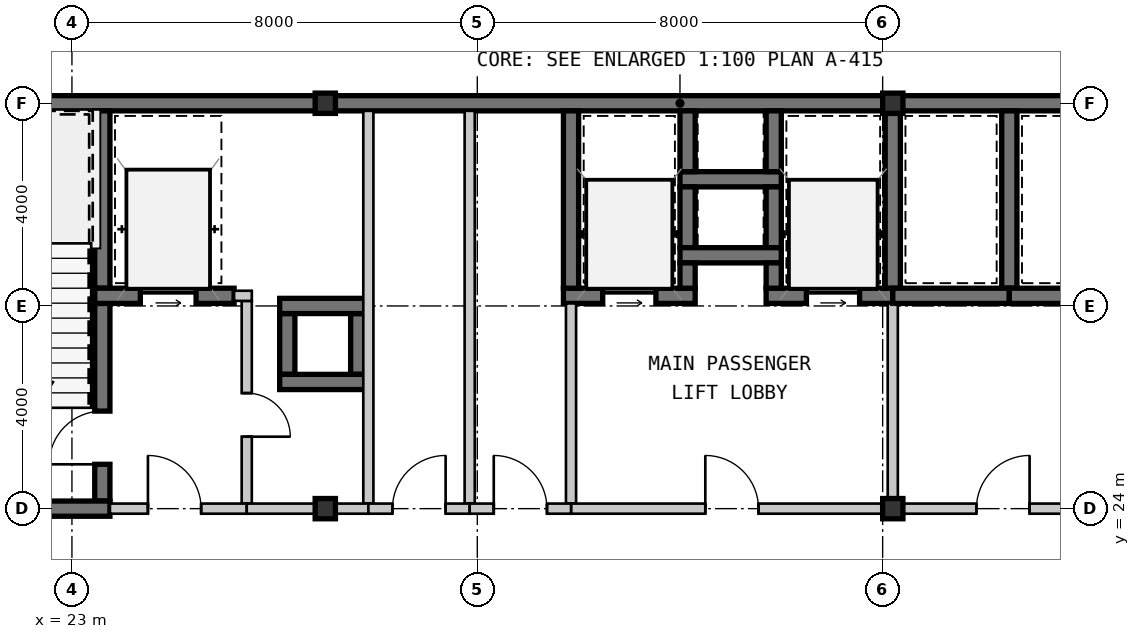
"""IFC4 building model, lengths in metres.
Left out: names, types, materials, properties, quantities, classifications, styles, units other than length and angle.
Written with IfcOpenShell. Run it as: python <this file> out.ifc"""

import sys

from ifc_helpers import new_model, si_unit, direction, frame, frame_2d, origin, origin_2d, place, context, subcontext, project, spatial, rectangle, hollow_rectangle, extrude, source, transform, mapped, element, fill, save


model = new_model("IFC4")
c1 = context("Model", 3, precision=1e-05, world=origin(), true_north=direction((0.0, 1.0)))
c2 = subcontext(c1, "Body", "Model", "MODEL_VIEW")
j1 = project(units=[si_unit("LENGTHUNIT", "METRE"), si_unit("PLANEANGLEUNIT", "RADIAN")], contexts=[c1])
p1 = place(None, origin())
s1 = spatial("IfcSite", under=j1, at=p1, CompositionType="ELEMENT")
p2 = place(p1, origin())
s2 = spatial("IfcBuilding", under=s1, at=p2, CompositionType="ELEMENT")
p3 = place(p2, frame((0.0, 0.0, 133.0)))
s3 = spatial("IfcBuildingStorey", under=s2, at=p3, CompositionType="ELEMENT", Elevation=133.0)
m1 = source(origin(), c2, "Body", "SweptSolid", [
    extrude(hollow_rectangle(XDim=0.4, YDim=0.4, WallThickness=0.016, at=origin_2d()), origin(), (0.0, 0.0, 1.0), 3.15),
])
for number, where, z_axis, x_axis in (
    (1, (28.0, 24.0, 0.0), (0.0, 0.0, 1.0), (1.0, 0.0, 0.0)),
    (2, (39.2, 24.0, 0.0), (0.0, 0.0, 1.0), (1.0, 0.0, 0.0)),
    (3, (28.0, 32.0, 0.0), (0.0, 0.0, 1.0), (1.0, 0.0, 0.0)),
    (4, (39.2, 32.0, 0.0), (0.0, 0.0, 1.0), (1.0, 0.0, 0.0)),
):
    element("IfcColumn", number, at=place(p3, frame(where, z_axis=z_axis, x_axis=x_axis)), inside=s3, PredefinedType="COLUMN", context=c2, shape_type="MappedRepresentation", body=[
        mapped(m1, transform((0.0, 0.0, 0.0), scale=1.0)),
    ])
m2 = source(origin(), c2, "Body", "SweptSolid", [
    extrude(rectangle(XDim=9.15, YDim=0.3, at=frame_2d((4.575, 0.0))), origin(), (0.0, 0.0, 1.0), 2.93),
])
p4 = place(p3, frame((18.85, 32.0, 0.0), z_axis=(0.0, 0.0, 1.0), x_axis=(1.0, 0.0, 0.0)))
e5 = element("IfcWall", 5, at=p4, inside=s3, PredefinedType="SHEAR", context=c2, shape_type="MappedRepresentation", body=[
    mapped(m2, transform((0.0, 0.0, 0.0), scale=1.0)),
])
m3 = source(origin(), c2, "Body", "SweptSolid", [
    extrude(rectangle(XDim=11.2, YDim=0.3, at=frame_2d((5.6, 0.0))), origin(), (0.0, 0.0, 1.0), 2.93),
])
p5 = place(p3, frame((28.0, 32.0, 0.0), z_axis=(0.0, 0.0, 1.0), x_axis=(1.0, 0.0, 0.0)))
e6 = element("IfcWall", 6, at=p5, inside=s3, PredefinedType="SHEAR", context=c2, shape_type="MappedRepresentation", body=[
    mapped(m3, transform((0.0, 0.0, 0.0), scale=1.0)),
])
m4 = source(origin(), c2, "Body", "SweptSolid", [
    extrude(rectangle(XDim=11.95, YDim=0.3, at=frame_2d((5.975, 0.0))), origin(), (0.0, 0.0, 1.0), 2.93),
])
p6 = place(p3, frame((39.2, 32.0, 0.0), z_axis=(0.0, 0.0, 1.0), x_axis=(1.0, 0.0, 0.0)))
e7 = element("IfcWall", 7, at=p6, inside=s3, PredefinedType="SHEAR", context=c2, shape_type="MappedRepresentation", body=[
    mapped(m4, transform((0.0, 0.0, 0.0), scale=1.0)),
])
m5 = source(origin(), c2, "Body", "SweptSolid", [
    extrude(rectangle(XDim=3.5, YDim=0.3, at=frame_2d((1.75, 0.0))), origin(), (0.0, 0.0, 1.0), 2.93),
])
p7 = place(p3, frame((23.6, 28.35, 0.0), z_axis=(0.0, 0.0, 1.0), x_axis=(0.0, 1.0, 0.0)))
e8 = element("IfcWall", 8, at=p7, inside=s3, PredefinedType="SHEAR", context=c2, shape_type="MappedRepresentation", body=[
    mapped(m5, transform((0.0, 0.0, 0.0), scale=1.0)),
])
m6 = source(origin(), c2, "Body", "SweptSolid", [
    extrude(rectangle(XDim=3.9, YDim=0.3, at=frame_2d((1.95, 0.0))), origin(), (0.0, 0.0, 1.0), 2.93),
])
p8 = place(p3, frame((23.6, 24.15, 0.0), z_axis=(0.0, 0.0, 1.0), x_axis=(0.0, 1.0, 0.0)))
e9 = element("IfcWall", 9, at=p8, inside=s3, PredefinedType="SHEAR", context=c2, shape_type="MappedRepresentation", body=[
    mapped(m6, transform((0.0, 0.0, 0.0), scale=1.0)),
])
m7 = source(origin(), c2, "Body", "SweptSolid", [
    extrude(rectangle(XDim=1.05, YDim=2.1, at=frame_2d((0.525, 1.05))), frame((0.0, 0.16, 0.0), z_axis=(0.0, -1.0, 0.0), x_axis=(1.0, 0.0, 0.0)), (0.0, 0.0, 1.0), 0.32),
])
p9 = place(p8, frame((0.725, 0.0, 0.0)))
e10 = element("IfcOpeningElement", 10, at=p9, cuts=e9, PredefinedType="OPENING", context=c2, shape_type="MappedRepresentation", body=[
    mapped(m7, transform((0.0, 0.0, 0.0), scale=1.0)),
])
m8 = source(origin(), c2, "Body", "SweptSolid", [
    extrude(rectangle(XDim=4.9, YDim=0.3, at=frame_2d((2.45, 0.0))), origin(), (0.0, 0.0, 1.0), 2.93),
])
p10 = place(p3, frame((18.85, 24.0, 0.0), z_axis=(0.0, 0.0, 1.0), x_axis=(1.0, 0.0, 0.0)))
e11 = element("IfcWall", 11, at=p10, inside=s3, PredefinedType="SHEAR", context=c2, shape_type="MappedRepresentation", body=[
    mapped(m8, transform((0.0, 0.0, 0.0), scale=1.0)),
])
m9 = source(origin(), c2, "Body", "SweptSolid", [
    extrude(rectangle(XDim=2.75, YDim=0.3, at=frame_2d((1.375, 0.0))), origin(), (0.0, 0.0, 1.0), 2.93),
])
p11 = place(p3, frame((23.45, 28.2, 0.0), z_axis=(0.0, 0.0, 1.0), x_axis=(1.0, 0.0, 0.0)))
e12 = element("IfcWall", 12, at=p11, inside=s3, PredefinedType="SHEAR", context=c2, shape_type="MappedRepresentation", body=[
    mapped(m9, transform((0.0, 0.0, 0.0), scale=1.0)),
])
m10 = source(origin(), c2, "Body", "SweptSolid", [
    extrude(rectangle(XDim=1.1, YDim=2.15, at=frame_2d((0.55, 1.075))), frame((0.0, 0.16, 0.0), z_axis=(0.0, -1.0, 0.0), x_axis=(1.0, 0.0, 0.0)), (0.0, 0.0, 1.0), 0.32),
])
p12 = place(p11, frame((0.9, 0.0, 0.0)))
e13 = element("IfcOpeningElement", 13, at=p12, cuts=e12, PredefinedType="OPENING", context=c2, shape_type="MappedRepresentation", body=[
    mapped(m10, transform((0.0, 0.0, 0.0), scale=1.0)),
])
m11 = source(origin(), c2, "Body", "SweptSolid", [
    extrude(rectangle(XDim=4.0, YDim=0.2, at=frame_2d((2.0, 0.0))), origin(), (0.0, 0.0, 1.0), 2.93),
])
p13 = place(p3, frame((26.45, 24.1, 0.0), z_axis=(0.0, 0.0, 1.0), x_axis=(0.0, 1.0, 0.0)))
e14 = element("IfcWall", 14, at=p13, inside=s3, PredefinedType="SOLIDWALL", context=c2, shape_type="MappedRepresentation", body=[
    mapped(m11, transform((0.0, 0.0, 0.0), scale=1.0)),
])
m12 = source(origin(), c2, "Body", "SweptSolid", [
    extrude(rectangle(XDim=0.86, YDim=2.1, at=frame_2d((0.43, 1.05))), frame((0.0, 0.11, 0.0), z_axis=(0.0, -1.0, 0.0), x_axis=(1.0, 0.0, 0.0)), (0.0, 0.0, 1.0), 0.22),
])
p14 = place(p13, frame((1.32, 0.0, 0.0)))
e15 = element("IfcOpeningElement", 15, at=p14, cuts=e14, PredefinedType="OPENING", context=c2, shape_type="MappedRepresentation", body=[
    mapped(m12, transform((0.0, 0.0, 0.0), scale=1.0)),
])
m13 = source(origin(), c2, "Body", "SweptSolid", [
    extrude(rectangle(XDim=2.7, YDim=0.2, at=frame_2d((1.35, 0.0))), origin(), (0.0, 0.0, 1.0), 2.47),
])
p15 = place(p3, frame((23.75, 24.0, 0.0), z_axis=(0.0, 0.0, 1.0), x_axis=(1.0, 0.0, 0.0)))
e16 = element("IfcWall", 16, at=p15, inside=s3, PredefinedType="SOLIDWALL", context=c2, shape_type="MappedRepresentation", body=[
    mapped(m13, transform((0.0, 0.0, 0.0), scale=1.0)),
])
m14 = source(origin(), c2, "Body", "SweptSolid", [
    extrude(rectangle(XDim=1.05, YDim=2.1, at=frame_2d((0.525, 1.05))), frame((0.0, 0.11, 0.0), z_axis=(0.0, -1.0, 0.0), x_axis=(1.0, 0.0, 0.0)), (0.0, 0.0, 1.0), 0.22),
])
p16 = place(p15, frame((0.75, 0.0, 0.0)))
e17 = element("IfcOpeningElement", 17, at=p16, cuts=e16, PredefinedType="OPENING", context=c2, shape_type="MappedRepresentation", body=[
    mapped(m14, transform((0.0, 0.0, 0.0), scale=1.0)),
])
m15 = source(origin(), c2, "Body", "SweptSolid", [
    extrude(rectangle(XDim=2.0, YDim=0.3, at=frame_2d((1.0, 0.0))), origin(), (0.0, 0.0, 1.0), 2.93),
])
p17 = place(p3, frame((35.0, 30.5, 0.0), z_axis=(0.0, 0.0, 1.0), x_axis=(1.0, 0.0, 0.0)))
e18 = element("IfcWall", 18, at=p17, inside=s3, PredefinedType="SHEAR", context=c2, shape_type="MappedRepresentation", body=[
    mapped(m15, transform((0.0, 0.0, 0.0), scale=1.0)),
])
m16 = source(origin(), c2, "Body", "SweptSolid", [
    extrude(rectangle(XDim=1.2, YDim=0.3, at=frame_2d((0.6, 0.0))), origin(), (0.0, 0.0, 1.0), 2.93),
])
for number, where, z_axis, x_axis in (
    (19, (35.15, 31.85, 0.0), (0.0, 0.0, 1.0), (0.0, -1.0, 0.0)),
    (20, (36.85, 30.65, 0.0), (0.0, 0.0, 1.0), (0.0, 1.0, 0.0)),
    (21, (35.15, 30.35, 0.0), (0.0, 0.0, 1.0), (0.0, -1.0, 0.0)),
    (22, (36.85, 29.15, 0.0), (0.0, 0.0, 1.0), (0.0, 1.0, 0.0)),
):
    element("IfcWall", number, at=place(p3, frame(where, z_axis=z_axis, x_axis=x_axis)), inside=s3, PredefinedType="SHEAR", context=c2, shape_type="MappedRepresentation", body=[
        mapped(m16, transform((0.0, 0.0, 0.0), scale=1.0)),
    ])
p18 = place(p3, frame((35.0, 29.0, 0.0), z_axis=(0.0, 0.0, 1.0), x_axis=(1.0, 0.0, 0.0)))
e23 = element("IfcWall", 23, at=p18, inside=s3, PredefinedType="SHEAR", context=c2, shape_type="MappedRepresentation", body=[
    mapped(m15, transform((0.0, 0.0, 0.0), scale=1.0)),
])
for number, where, z_axis, x_axis in (
    (24, (28.65, 26.65, 0.0), (0.0, 0.0, 1.0), (0.0, 1.0, 0.0)),
    (25, (27.25, 27.85, 0.0), (0.0, 0.0, 1.0), (0.0, -1.0, 0.0)),
):
    element("IfcWall", number, at=place(p3, frame(where, z_axis=z_axis, x_axis=x_axis)), inside=s3, PredefinedType="SHEAR", context=c2, shape_type="MappedRepresentation", body=[
        mapped(m16, transform((0.0, 0.0, 0.0), scale=1.0)),
    ])
m17 = source(origin(), c2, "Body", "SweptSolid", [
    extrude(rectangle(XDim=1.7, YDim=0.3, at=frame_2d((0.85, 0.0))), origin(), (0.0, 0.0, 1.0), 2.93),
])
for number, where, z_axis, x_axis in (
    (26, (28.8, 28.0, 0.0), (0.0, 0.0, 1.0), (-1.0, 0.0, 0.0)),
    (27, (27.1, 26.5, 0.0), (0.0, 0.0, 1.0), (1.0, 0.0, 0.0)),
):
    element("IfcWall", number, at=place(p3, frame(where, z_axis=z_axis, x_axis=x_axis)), inside=s3, PredefinedType="SHEAR", context=c2, shape_type="MappedRepresentation", body=[
        mapped(m17, transform((0.0, 0.0, 0.0), scale=1.0)),
    ])
m18 = source(origin(), c2, "Body", "SweptSolid", [
    extrude(rectangle(XDim=2.6, YDim=0.3, at=frame_2d((1.3, 0.0))), origin(), (0.0, 0.0, 1.0), 2.93),
])
p19 = place(p3, frame((32.7, 28.2, 0.0), z_axis=(0.0, 0.0, 1.0), x_axis=(1.0, 0.0, 0.0)))
e28 = element("IfcWall", 28, at=p19, inside=s3, PredefinedType="SHEAR", context=c2, shape_type="MappedRepresentation", body=[
    mapped(m18, transform((0.0, 0.0, 0.0), scale=1.0)),
])
m19 = source(origin(), c2, "Body", "SweptSolid", [
    extrude(rectangle(XDim=1.05, YDim=2.15, at=frame_2d((0.525, 1.075))), frame((0.0, 0.16, 0.0), z_axis=(0.0, -1.0, 0.0), x_axis=(1.0, 0.0, 0.0)), (0.0, 0.0, 1.0), 0.32),
])
p20 = place(p19, frame((0.775, 0.0, 0.0)))
e29 = element("IfcOpeningElement", 29, at=p20, cuts=e28, PredefinedType="OPENING", context=c2, shape_type="MappedRepresentation", body=[
    mapped(m19, transform((0.0, 0.0, 0.0), scale=1.0)),
])
m20 = source(origin(), c2, "Body", "SweptSolid", [
    extrude(rectangle(XDim=0.5, YDim=0.3, at=frame_2d((0.25, 0.0))), origin(), (0.0, 0.0, 1.0), 2.93),
])
p21 = place(p3, frame((35.15, 28.35, 0.0), z_axis=(0.0, 0.0, 1.0), x_axis=(0.0, 1.0, 0.0)))
e30 = element("IfcWall", 30, at=p21, inside=s3, PredefinedType="SHEAR", context=c2, shape_type="MappedRepresentation", body=[
    mapped(m20, transform((0.0, 0.0, 0.0), scale=1.0)),
])
p22 = place(p3, frame((32.85, 31.85, 0.0), z_axis=(0.0, 0.0, 1.0), x_axis=(0.0, -1.0, 0.0)))
e31 = element("IfcWall", 31, at=p22, inside=s3, PredefinedType="SHEAR", context=c2, shape_type="MappedRepresentation", body=[
    mapped(m5, transform((0.0, 0.0, 0.0), scale=1.0)),
])
m21 = source(origin(), c2, "Body", "SweptSolid", [
    extrude(rectangle(XDim=2.5, YDim=0.3, at=frame_2d((1.25, 0.0))), origin(), (0.0, 0.0, 1.0), 2.93),
])
p23 = place(p3, frame((36.7, 28.2, 0.0), z_axis=(0.0, 0.0, 1.0), x_axis=(1.0, 0.0, 0.0)))
e32 = element("IfcWall", 32, at=p23, inside=s3, PredefinedType="SHEAR", context=c2, shape_type="MappedRepresentation", body=[
    mapped(m21, transform((0.0, 0.0, 0.0), scale=1.0)),
])
p24 = place(p23, frame((0.795, 0.0, 0.0)))
e33 = element("IfcOpeningElement", 33, at=p24, cuts=e32, PredefinedType="OPENING", context=c2, shape_type="MappedRepresentation", body=[
    mapped(m19, transform((0.0, 0.0, 0.0), scale=1.0)),
])
p25 = place(p3, frame((36.85, 28.85, 0.0), z_axis=(0.0, 0.0, 1.0), x_axis=(0.0, -1.0, 0.0)))
e34 = element("IfcWall", 34, at=p25, inside=s3, PredefinedType="SHEAR", context=c2, shape_type="MappedRepresentation", body=[
    mapped(m20, transform((0.0, 0.0, 0.0), scale=1.0)),
])
p26 = place(p3, frame((39.2, 28.35, 0.0), z_axis=(0.0, 0.0, 1.0), x_axis=(0.0, 1.0, 0.0)))
e35 = element("IfcWall", 35, at=p26, inside=s3, PredefinedType="SHEAR", context=c2, shape_type="MappedRepresentation", body=[
    mapped(m5, transform((0.0, 0.0, 0.0), scale=1.0)),
])
m22 = source(origin(), c2, "Body", "SweptSolid", [
    extrude(rectangle(XDim=3.95, YDim=0.2, at=frame_2d((1.975, 0.0))), origin(), (0.0, 0.0, 1.0), 2.93),
])
p27 = place(p3, frame((32.85, 24.1, 0.0), z_axis=(0.0, 0.0, 1.0), x_axis=(0.0, 1.0, 0.0)))
e36 = element("IfcWall", 36, at=p27, inside=s3, PredefinedType="SOLIDWALL", context=c2, shape_type="MappedRepresentation", body=[
    mapped(m22, transform((0.0, 0.0, 0.0), scale=1.0)),
])
m23 = source(origin(), c2, "Body", "SweptSolid", [
    extrude(rectangle(XDim=3.95, YDim=0.2, at=frame_2d((1.975, 0.0))), origin(), (0.0, 0.0, 1.0), 2.47),
])
p28 = place(p3, frame((39.2, 28.05, 0.0), z_axis=(0.0, 0.0, 1.0), x_axis=(0.0, -1.0, 0.0)))
e37 = element("IfcWall", 37, at=p28, inside=s3, PredefinedType="SOLIDWALL", context=c2, shape_type="MappedRepresentation", body=[
    mapped(m23, transform((0.0, 0.0, 0.0), scale=1.0)),
])
m24 = source(origin(), c2, "Body", "SweptSolid", [
    extrude(rectangle(XDim=6.35, YDim=0.2, at=frame_2d((3.175, 0.0))), origin(), (0.0, 0.0, 1.0), 2.47),
])
p29 = place(p3, frame((39.2, 24.0, 0.0), z_axis=(0.0, 0.0, 1.0), x_axis=(-1.0, 0.0, 0.0)))
e38 = element("IfcWall", 38, at=p29, inside=s3, PredefinedType="SOLIDWALL", context=c2, shape_type="MappedRepresentation", body=[
    mapped(m24, transform((0.0, 0.0, 0.0), scale=1.0)),
])
p30 = place(p29, frame((2.65, 0.0, 0.0)))
e39 = element("IfcOpeningElement", 39, at=p30, cuts=e38, PredefinedType="OPENING", context=c2, shape_type="MappedRepresentation", body=[
    mapped(m14, transform((0.0, 0.0, 0.0), scale=1.0)),
])
p31 = place(p3, frame((41.5, 28.35, 0.0), z_axis=(0.0, 0.0, 1.0), x_axis=(0.0, 1.0, 0.0)))
e40 = element("IfcWall", 40, at=p31, inside=s3, PredefinedType="SHEAR", context=c2, shape_type="MappedRepresentation", body=[
    mapped(m5, transform((0.0, 0.0, 0.0), scale=1.0)),
])
m25 = source(origin(), c2, "Body", "SweptSolid", [
    extrude(rectangle(XDim=2.3, YDim=0.3, at=frame_2d((1.15, 0.0))), origin(), (0.0, 0.0, 1.0), 2.93),
])
p32 = place(p3, frame((39.2, 28.2, 0.0), z_axis=(0.0, 0.0, 1.0), x_axis=(1.0, 0.0, 0.0)))
e41 = element("IfcWall", 41, at=p32, inside=s3, PredefinedType="SHEAR", context=c2, shape_type="MappedRepresentation", body=[
    mapped(m25, transform((0.0, 0.0, 0.0), scale=1.0)),
])
m26 = source(origin(), c2, "Body", "SweptSolid", [
    extrude(rectangle(XDim=2.07, YDim=0.3, at=frame_2d((1.035, 0.0))), origin(), (0.0, 0.0, 1.0), 2.93),
])
p33 = place(p3, frame((41.5, 28.2, 0.0), z_axis=(0.0, 0.0, 1.0), x_axis=(1.0, 0.0, 0.0)))
e42 = element("IfcWall", 42, at=p33, inside=s3, PredefinedType="SHEAR", context=c2, shape_type="MappedRepresentation", body=[
    mapped(m26, transform((0.0, 0.0, 0.0), scale=1.0)),
])
m27 = source(origin(), c2, "Body", "SweptSolid", [
    extrude(rectangle(XDim=7.75, YDim=0.2, at=frame_2d((3.875, 0.0))), origin(), (0.0, 0.0, 1.0), 2.93),
])
p34 = place(p3, frame((28.85, 31.85, 0.0), z_axis=(0.0, 0.0, 1.0), x_axis=(0.0, -1.0, 0.0)))
e43 = element("IfcWall", 43, at=p34, inside=s3, PredefinedType="SOLIDWALL", context=c2, shape_type="MappedRepresentation", body=[
    mapped(m27, transform((0.0, 0.0, 0.0), scale=1.0)),
])
m28 = source(origin(), c2, "Body", "SweptSolid", [
    extrude(rectangle(XDim=2.4, YDim=0.2, at=frame_2d((1.2, 0.0))), origin(), (0.0, 0.0, 1.0), 2.47),
])
p35 = place(p3, frame((28.85, 24.0, 0.0), z_axis=(0.0, 0.0, 1.0), x_axis=(-1.0, 0.0, 0.0)))
e44 = element("IfcWall", 44, at=p35, inside=s3, PredefinedType="SOLIDWALL", context=c2, shape_type="MappedRepresentation", body=[
    mapped(m28, transform((0.0, 0.0, 0.0), scale=1.0)),
])
p36 = place(p3, frame((30.85, 31.85, 0.0), z_axis=(0.0, 0.0, 1.0), x_axis=(0.0, -1.0, 0.0)))
e45 = element("IfcWall", 45, at=p36, inside=s3, PredefinedType="SOLIDWALL", context=c2, shape_type="MappedRepresentation", body=[
    mapped(m27, transform((0.0, 0.0, 0.0), scale=1.0)),
])
m29 = source(origin(), c2, "Body", "SweptSolid", [
    extrude(rectangle(XDim=2.0, YDim=0.2, at=frame_2d((1.0, 0.0))), origin(), (0.0, 0.0, 1.0), 2.47),
])
p37 = place(p3, frame((30.85, 24.0, 0.0), z_axis=(0.0, 0.0, 1.0), x_axis=(-1.0, 0.0, 0.0)))
e46 = element("IfcWall", 46, at=p37, inside=s3, PredefinedType="SOLIDWALL", context=c2, shape_type="MappedRepresentation", body=[
    mapped(m29, transform((0.0, 0.0, 0.0), scale=1.0)),
])
p38 = place(p37, frame((0.475, 0.0, 0.0)))
e47 = element("IfcOpeningElement", 47, at=p38, cuts=e46, PredefinedType="OPENING", context=c2, shape_type="MappedRepresentation", body=[
    mapped(m14, transform((0.0, 0.0, 0.0), scale=1.0)),
])
p39 = place(p3, frame((32.85, 24.0, 0.0), z_axis=(0.0, 0.0, 1.0), x_axis=(-1.0, 0.0, 0.0)))
e48 = element("IfcWall", 48, at=p39, inside=s3, PredefinedType="SOLIDWALL", context=c2, shape_type="MappedRepresentation", body=[
    mapped(m29, transform((0.0, 0.0, 0.0), scale=1.0)),
])
p40 = place(p39, frame((0.475, 0.0, 0.0)))
e49 = element("IfcOpeningElement", 49, at=p40, cuts=e48, PredefinedType="OPENING", context=c2, shape_type="MappedRepresentation", body=[
    mapped(m14, transform((0.0, 0.0, 0.0), scale=1.0)),
])
m30 = source(origin(), c2, "Body", "SweptSolid", [
    extrude(rectangle(XDim=4.35, YDim=0.2, at=frame_2d((2.175, 0.0))), origin(), (0.0, 0.0, 1.0), 2.397),
])
p41 = place(p3, frame((43.55, 24.0, 0.0), z_axis=(0.0, 0.0, 1.0), x_axis=(-1.0, 0.0, 0.0)))
e50 = element("IfcWall", 50, at=p41, inside=s3, PredefinedType="SOLIDWALL", context=c2, shape_type="MappedRepresentation", body=[
    mapped(m30, transform((0.0, 0.0, 0.0), scale=1.0)),
])
p42 = place(p41, frame((1.65, 0.0, 0.0)))
e51 = element("IfcOpeningElement", 51, at=p42, cuts=e50, PredefinedType="OPENING", context=c2, shape_type="MappedRepresentation", body=[
    mapped(m14, transform((0.0, 0.0, 0.0), scale=1.0)),
])
m31 = source(origin(), c2, "Body", "SweptSolid", [
    extrude(rectangle(XDim=0.35, YDim=0.2, at=frame_2d((0.175, 0.0))), origin(), (0.0, 0.0, 1.0), 2.93),
])
p43 = place(p3, frame((26.2, 28.2, 0.0), z_axis=(0.0, 0.0, 1.0), x_axis=(1.0, 0.0, 0.0)))
e52 = element("IfcWall", 52, at=p43, inside=s3, PredefinedType="SOLIDWALL", context=c2, shape_type="MappedRepresentation", body=[
    mapped(m31, transform((0.0, 0.0, 0.0), scale=1.0)),
])
m32 = source(origin(), c2, "Body", "SweptSolid", [
    extrude(rectangle(XDim=1.05, YDim=2.1, at=frame_2d((0.525, 1.05))), frame((0.0, 0.025, 0.0), z_axis=(0.0, -1.0, 0.0), x_axis=(1.0, 0.0, 0.0)), (0.0, 0.0, 1.0), 0.05),
])
p44 = place(p9, origin())
e53 = element("IfcDoor", 53, at=p44, inside=s3, OperationType="SINGLE_SWING_LEFT", PredefinedType="DOOR", context=c2, shape_type="MappedRepresentation", body=[
    mapped(m32, transform((0.0, 0.0, 0.0), scale=1.0)),
])
fill(e10, e53)
m33 = source(origin(), c2, "Body", "SweptSolid", [
    extrude(rectangle(XDim=1.1, YDim=2.15, at=frame_2d((0.55, 1.075))), frame((0.0, 0.025, 0.0), z_axis=(0.0, -1.0, 0.0), x_axis=(1.0, 0.0, 0.0)), (0.0, 0.0, 1.0), 0.05),
])
p45 = place(p12, origin())
e54 = element("IfcDoor", 54, at=p45, inside=s3, OperationType="SLIDING_TO_LEFT", PredefinedType="DOOR", context=c2, shape_type="MappedRepresentation", body=[
    mapped(m33, transform((0.0, 0.0, 0.0), scale=1.0)),
])
fill(e13, e54)
p46 = place(p16, origin())
e55 = element("IfcDoor", 55, at=p46, inside=s3, OperationType="SINGLE_SWING_LEFT", PredefinedType="DOOR", context=c2, shape_type="MappedRepresentation", body=[
    mapped(m32, transform((0.0, 0.0, 0.0), scale=1.0)),
])
fill(e17, e55)
m34 = source(origin(), c2, "Body", "SweptSolid", [
    extrude(rectangle(XDim=1.05, YDim=2.15, at=frame_2d((0.525, 1.075))), frame((0.0, 0.025, 0.0), z_axis=(0.0, -1.0, 0.0), x_axis=(1.0, 0.0, 0.0)), (0.0, 0.0, 1.0), 0.05),
])
p47 = place(p20, origin())
e56 = element("IfcDoor", 56, at=p47, inside=s3, OperationType="SLIDING_TO_LEFT", PredefinedType="DOOR", context=c2, shape_type="MappedRepresentation", body=[
    mapped(m34, transform((0.0, 0.0, 0.0), scale=1.0)),
])
fill(e29, e56)
p48 = place(p24, origin())
e57 = element("IfcDoor", 57, at=p48, inside=s3, OperationType="SLIDING_TO_LEFT", PredefinedType="DOOR", context=c2, shape_type="MappedRepresentation", body=[
    mapped(m34, transform((0.0, 0.0, 0.0), scale=1.0)),
])
fill(e33, e57)
p49 = place(p30, frame((1.05, 0.0, 0.0), z_axis=(0.0, 0.0, 1.0), x_axis=(-1.0, 0.0, 0.0)))
e58 = element("IfcDoor", 58, at=p49, inside=s3, OperationType="SINGLE_SWING_LEFT", PredefinedType="DOOR", context=c2, shape_type="MappedRepresentation", body=[
    mapped(m32, transform((0.0, 0.0, 0.0), scale=1.0)),
])
fill(e39, e58)
p50 = place(p38, frame((1.05, 0.0, 0.0), z_axis=(0.0, 0.0, 1.0), x_axis=(-1.0, 0.0, 0.0)))
e59 = element("IfcDoor", 59, at=p50, inside=s3, OperationType="SINGLE_SWING_RIGHT", PredefinedType="DOOR", context=c2, shape_type="MappedRepresentation", body=[
    mapped(m32, transform((0.0, 0.0, 0.0), scale=1.0)),
])
fill(e47, e59)
p51 = place(p40, frame((1.05, 0.0, 0.0), z_axis=(0.0, 0.0, 1.0), x_axis=(-1.0, 0.0, 0.0)))
e60 = element("IfcDoor", 60, at=p51, inside=s3, OperationType="SINGLE_SWING_LEFT", PredefinedType="DOOR", context=c2, shape_type="MappedRepresentation", body=[
    mapped(m32, transform((0.0, 0.0, 0.0), scale=1.0)),
])
fill(e49, e60)
p52 = place(p42, frame((1.05, 0.0, 0.0), z_axis=(0.0, 0.0, 1.0), x_axis=(-1.0, 0.0, 0.0)))
e61 = element("IfcDoor", 61, at=p52, inside=s3, OperationType="SINGLE_SWING_RIGHT", PredefinedType="DOOR", context=c2, shape_type="MappedRepresentation", body=[
    mapped(m32, transform((0.0, 0.0, 0.0), scale=1.0)),
])
fill(e51, e61)
m35 = source(origin(), c2, "Body", "SweptSolid", [
    extrude(rectangle(XDim=0.86, YDim=2.1, at=frame_2d((0.43, 1.05))), frame((0.0, 0.025, 0.0), z_axis=(0.0, -1.0, 0.0), x_axis=(1.0, 0.0, 0.0)), (0.0, 0.0, 1.0), 0.05),
])
p53 = place(p14, frame((0.86, 0.0, 0.0), z_axis=(0.0, 0.0, 1.0), x_axis=(-1.0, 0.0, 0.0)))
e62 = element("IfcDoor", 62, at=p53, inside=s3, OperationType="SINGLE_SWING_RIGHT", PredefinedType="DOOR", context=c2, shape_type="MappedRepresentation", body=[
    mapped(m35, transform((0.0, 0.0, 0.0), scale=1.0)),
])
fill(e15, e62)
save(model, sys.argv[1])
